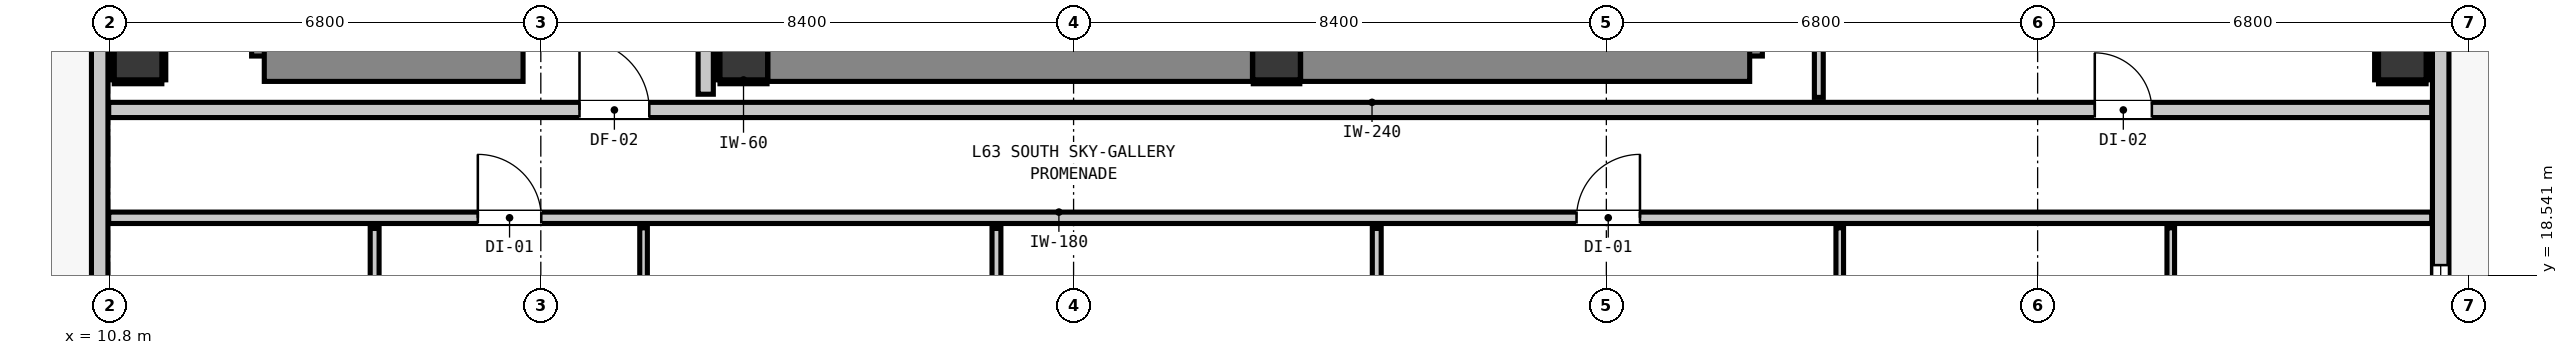
"""IFC4 building model, lengths in metres.
Left out: names, types, materials, properties, quantities, classifications, styles, units other than length and angle.
Written with IfcOpenShell. Run it as: python <this file> out.ifc"""

import sys

from ifc_helpers import new_model, si_unit, direction, frame, frame_2d, origin, origin_2d, place, context, subcontext, project, spatial, rectangle, extrude, element, fill, save


model = new_model("IFC4")
c1 = context("Model", 3, precision=1e-05, world=origin(), true_north=direction((0.0, 1.0)))
c2 = subcontext(c1, "Body", "Model", "MODEL_VIEW")
j1 = project(units=[si_unit("LENGTHUNIT", "METRE"), si_unit("PLANEANGLEUNIT", "RADIAN")], contexts=[c1])
p1 = place(None, origin())
s1 = spatial("IfcSite", under=j1, at=p1, CompositionType="ELEMENT")
p2 = place(p1, origin())
s2 = spatial("IfcBuilding", under=s1, at=p2, CompositionType="ELEMENT")
p3 = place(p2, frame((0.0, 0.0, 216.72)))
s3 = spatial("IfcBuildingStorey", under=s2, at=p3, CompositionType="ELEMENT", Elevation=216.72)
for number, where, z_axis, x_axis in (
    (1, (20.8, 22.0, 0.0), (0.0, 0.0, 1.0), (1.0, 0.0, 0.0)),
    (2, (29.2, 22.0, 0.0), (0.0, 0.0, 1.0), (1.0, 0.0, 0.0)),
):
    element("IfcColumn", number, at=place(p3, frame(where, z_axis=z_axis, x_axis=x_axis)), inside=s3, PredefinedType="COLUMN", context=c2, shape_type="SweptSolid", body=[
        extrude(rectangle(XDim=0.75, YDim=0.75, at=origin_2d()), origin(), (0.0, 0.0, 1.0), 3.32),
    ])
p4 = place(p3, frame((13.44, 22.0, 0.0), z_axis=(0.0, 0.0, 1.0), x_axis=(0.0, 1.0, 0.0)))
e3 = element("IfcWall", 3, at=p4, inside=s3, PredefinedType="SHEAR", context=c2, shape_type="SweptSolid", body=[
    extrude(rectangle(XDim=8.32, YDim=0.8, at=frame_2d((4.16, 0.0))), origin(), (0.0, 0.0, 1.0), 3.32),
])
p5 = place(p3, frame((13.24, 22.0, 0.0), z_axis=(0.0, 0.0, 1.0), x_axis=(1.0, 0.0, 0.0)))
e4 = element("IfcWall", 4, at=p5, inside=s3, PredefinedType="SHEAR", context=c2, shape_type="SweptSolid", body=[
    extrude(rectangle(XDim=4.08, YDim=0.8, at=frame_2d((2.04, 0.0))), origin(), (0.0, 0.0, 1.0), 3.32),
])
p6 = place(p3, frame((36.46, 22.0, 0.0), z_axis=(0.0, 0.0, 1.0), x_axis=(0.0, 1.0, 0.0)))
e5 = element("IfcWall", 5, at=p6, inside=s3, PredefinedType="SHEAR", context=c2, shape_type="SweptSolid", body=[
    extrude(rectangle(XDim=8.32, YDim=0.8, at=frame_2d((4.16, 0.0))), origin(), (0.0, 0.0, 1.0), 3.32),
])
p7 = place(p3, frame((29.58, 22.0, 0.0), z_axis=(0.0, 0.0, 1.0), x_axis=(1.0, 0.0, 0.0)))
e6 = element("IfcWall", 6, at=p7, inside=s3, PredefinedType="SHEAR", context=c2, shape_type="SweptSolid", body=[
    extrude(rectangle(XDim=7.08, YDim=0.8, at=frame_2d((3.54, 0.0))), origin(), (0.0, 0.0, 1.0), 3.32),
])
p8 = place(p3, frame((21.18, 22.0, 0.0), z_axis=(0.0, 0.0, 1.0), x_axis=(1.0, 0.0, 0.0)))
e7 = element("IfcWall", 7, at=p8, inside=s3, PredefinedType="SHEAR", context=c2, shape_type="SweptSolid", body=[
    extrude(rectangle(XDim=7.64, YDim=0.8, at=frame_2d((3.82, 0.0))), origin(), (0.0, 0.0, 1.0), 3.32),
])
for number, where, z_axis, x_axis in (
    (8, (11.25, 22.0, 0.0), (0.0, 0.0, 1.0), (1.0, 0.0, 0.0)),
    (9, (46.95, 22.0, 0.0), (0.0, 0.0, 1.0), (1.0, 0.0, 0.0)),
):
    element("IfcColumn", number, at=place(p3, frame(where, z_axis=z_axis, x_axis=x_axis)), inside=s3, PredefinedType="COLUMN", context=c2, shape_type="SweptSolid", body=[
        extrude(rectangle(XDim=0.75, YDim=0.75, at=origin_2d()), origin(), (0.0, 0.0, 1.0), 3.32),
    ])
p9 = place(p3, frame((10.645, 12.345, 0.0), z_axis=(0.0, 0.0, 1.0), x_axis=(0.0, 1.0, 0.0)))
e10 = element("IfcWall", 10, at=p9, inside=s3, PredefinedType="STANDARD", context=c2, shape_type="SweptSolid", body=[
    extrude(rectangle(XDim=30.31, YDim=0.26, at=frame_2d((15.155, 0.0))), origin(), (0.0, 0.0, 1.0), 3.1),
])
p10 = place(p9, frame((0.91, 0.0, 0.0)))
e11 = element("IfcOpeningElement", 11, at=p10, cuts=e10, PredefinedType="OPENING", context=c2, shape_type="SweptSolid", body=[
    extrude(rectangle(XDim=1.0, YDim=2.15, at=frame_2d((0.5, 1.075))), frame((0.0, 0.14, 0.0), z_axis=(0.0, -1.0, 0.0), x_axis=(1.0, 0.0, 0.0)), (0.0, 0.0, 1.0), 0.28),
])
p11 = place(p9, frame((2.322, 0.0, 0.85)))
e12 = element("IfcOpeningElement", 12, at=p11, cuts=e10, PredefinedType="OPENING", context=c2, shape_type="SweptSolid", body=[
    extrude(rectangle(XDim=0.58, YDim=1.5, at=frame_2d((0.29, 0.75))), frame((0.0, 0.14, 0.0), z_axis=(0.0, -1.0, 0.0), x_axis=(1.0, 0.0, 0.0)), (0.0, 0.0, 1.0), 0.28),
])
p12 = place(p3, frame((47.555, 42.655, 0.0), z_axis=(0.0, 0.0, 1.0), x_axis=(0.0, -1.0, 0.0)))
e13 = element("IfcWall", 13, at=p12, inside=s3, PredefinedType="STANDARD", context=c2, shape_type="SweptSolid", body=[
    extrude(rectangle(XDim=30.31, YDim=0.26, at=frame_2d((15.155, 0.0))), origin(), (0.0, 0.0, 1.0), 3.1),
])
p13 = place(p12, frame((4.082, 0.0, 0.0)))
e14 = element("IfcOpeningElement", 14, at=p13, cuts=e13, PredefinedType="OPENING", context=c2, shape_type="SweptSolid", body=[
    extrude(rectangle(XDim=1.0, YDim=2.15, at=frame_2d((0.5, 1.075))), frame((0.0, 0.14, 0.0), z_axis=(0.0, -1.0, 0.0), x_axis=(1.0, 0.0, 0.0)), (0.0, 0.0, 1.0), 0.28),
])
p14 = place(p12, frame((23.951, 0.0, 0.85)))
e15 = element("IfcOpeningElement", 15, at=p14, cuts=e13, PredefinedType="OPENING", context=c2, shape_type="SweptSolid", body=[
    extrude(rectangle(XDim=2.4, YDim=1.95, at=frame_2d((1.2, 0.975))), frame((0.0, 0.14, 0.0), z_axis=(0.0, -1.0, 0.0), x_axis=(1.0, 0.0, 0.0)), (0.0, 0.0, 1.0), 0.28),
])
p15 = place(p12, frame((27.508, 0.0, 0.85)))
e16 = element("IfcOpeningElement", 16, at=p15, cuts=e13, PredefinedType="OPENING", context=c2, shape_type="SweptSolid", body=[
    extrude(rectangle(XDim=2.4, YDim=1.95, at=frame_2d((1.2, 0.975))), frame((0.0, 0.14, 0.0), z_axis=(0.0, -1.0, 0.0), x_axis=(1.0, 0.0, 0.0)), (0.0, 0.0, 1.0), 0.28),
])
p16 = place(p12, frame((15.105, 0.0, 0.85)))
e17 = element("IfcOpeningElement", 17, at=p16, cuts=e13, PredefinedType="OPENING", context=c2, shape_type="SweptSolid", body=[
    extrude(rectangle(XDim=2.4, YDim=1.95, at=frame_2d((1.2, 0.975))), frame((0.0, 0.14, 0.0), z_axis=(0.0, -1.0, 0.0), x_axis=(1.0, 0.0, 0.0)), (0.0, 0.0, 1.0), 0.28),
])
p17 = place(p3, frame((10.787, 21.15, 0.0), z_axis=(0.0, 0.0, 1.0), x_axis=(1.0, 0.0, 0.0)))
e18 = element("IfcWall", 18, at=p17, inside=s3, PredefinedType="PARTITIONING", context=c2, shape_type="SweptSolid", body=[
    extrude(rectangle(XDim=36.626, YDim=0.24, at=frame_2d((18.313, 0.0))), origin(), (0.0, 0.0, 1.0), 3.1),
])
p18 = place(p17, frame((7.423, 0.0, 0.0)))
e19 = element("IfcOpeningElement", 19, at=p18, cuts=e18, PredefinedType="OPENING", context=c2, shape_type="SweptSolid", body=[
    extrude(rectangle(XDim=1.1, YDim=2.15, at=frame_2d((0.55, 1.075))), frame((0.0, 0.13, 0.0), z_axis=(0.0, -1.0, 0.0), x_axis=(1.0, 0.0, 0.0)), (0.0, 0.0, 1.0), 0.26),
])
p19 = place(p17, frame((31.314, 0.0, 0.0)))
e20 = element("IfcOpeningElement", 20, at=p19, cuts=e18, PredefinedType="OPENING", context=c2, shape_type="SweptSolid", body=[
    extrude(rectangle(XDim=0.9, YDim=2.1, at=frame_2d((0.45, 1.05))), frame((0.0, 0.13, 0.0), z_axis=(0.0, -1.0, 0.0), x_axis=(1.0, 0.0, 0.0)), (0.0, 0.0, 1.0), 0.26),
])
p20 = place(p3, frame((10.787, 19.45, 0.0), z_axis=(0.0, 0.0, 1.0), x_axis=(1.0, 0.0, 0.0)))
e21 = element("IfcWall", 21, at=p20, inside=s3, PredefinedType="PARTITIONING", context=c2, shape_type="SweptSolid", body=[
    extrude(rectangle(XDim=36.626, YDim=0.18, at=frame_2d((18.313, 0.0))), origin(), (0.0, 0.0, 1.0), 3.1),
])
p21 = place(p20, frame((5.82, 0.0, 0.0)))
e22 = element("IfcOpeningElement", 22, at=p21, cuts=e21, PredefinedType="OPENING", context=c2, shape_type="SweptSolid", body=[
    extrude(rectangle(XDim=1.0, YDim=2.15, at=frame_2d((0.5, 1.075))), frame((0.0, 0.1, 0.0), z_axis=(0.0, -1.0, 0.0), x_axis=(1.0, 0.0, 0.0)), (0.0, 0.0, 1.0), 0.2),
])
p22 = place(p20, frame((23.143, 0.0, 0.0)))
e23 = element("IfcOpeningElement", 23, at=p22, cuts=e21, PredefinedType="OPENING", context=c2, shape_type="SweptSolid", body=[
    extrude(rectangle(XDim=1.0, YDim=2.15, at=frame_2d((0.5, 1.075))), frame((0.0, 0.1, 0.0), z_axis=(0.0, -1.0, 0.0), x_axis=(1.0, 0.0, 0.0)), (0.0, 0.0, 1.0), 0.2),
])
p23 = place(p3, frame((20.2, 21.398, 0.0), z_axis=(0.0, 0.0, 1.0), x_axis=(0.0, 1.0, 0.0)))
e24 = element("IfcWall", 24, at=p23, inside=s3, PredefinedType="PARTITIONING", context=c2, shape_type="SweptSolid", body=[
    extrude(rectangle(XDim=6.754, YDim=0.24, at=frame_2d((3.377, 0.0))), origin(), (0.0, 0.0, 1.0), 3.1),
])
p24 = place(p3, frame((14.98, 15.707, 0.0), z_axis=(0.0, 0.0, 1.0), x_axis=(0.0, 1.0, 0.0)))
e25 = element("IfcWall", 25, at=p24, inside=s3, PredefinedType="PARTITIONING", context=c2, shape_type="SweptSolid", body=[
    extrude(rectangle(XDim=3.575, YDim=0.14, at=frame_2d((1.788, 0.0))), origin(), (0.0, 0.0, 1.0), 3.1),
])
p25 = place(p24, frame((1.355, 0.0, 0.0)))
e26 = element("IfcOpeningElement", 26, at=p25, cuts=e25, PredefinedType="OPENING", context=c2, shape_type="SweptSolid", body=[
    extrude(rectangle(XDim=0.86, YDim=2.02, at=frame_2d((0.43, 1.01))), frame((0.0, 0.08, 0.0), z_axis=(0.0, -1.0, 0.0), x_axis=(1.0, 0.0, 0.0)), (0.0, 0.0, 1.0), 0.16),
])
p26 = place(p3, frame((24.784, 15.707, 0.0), z_axis=(0.0, 0.0, 1.0), x_axis=(0.0, 1.0, 0.0)))
e27 = element("IfcWall", 27, at=p26, inside=s3, PredefinedType="PARTITIONING", context=c2, shape_type="SweptSolid", body=[
    extrude(rectangle(XDim=3.575, YDim=0.14, at=frame_2d((1.788, 0.0))), origin(), (0.0, 0.0, 1.0), 3.1),
])
p27 = place(p3, frame((30.78, 15.707, 0.0), z_axis=(0.0, 0.0, 1.0), x_axis=(0.0, 1.0, 0.0)))
e28 = element("IfcWall", 28, at=p27, inside=s3, PredefinedType="PARTITIONING", context=c2, shape_type="SweptSolid", body=[
    extrude(rectangle(XDim=3.575, YDim=0.14, at=frame_2d((1.788, 0.0))), origin(), (0.0, 0.0, 1.0), 3.1),
])
p28 = place(p27, frame((1.355, 0.0, 0.0)))
e29 = element("IfcOpeningElement", 29, at=p28, cuts=e28, PredefinedType="OPENING", context=c2, shape_type="SweptSolid", body=[
    extrude(rectangle(XDim=0.86, YDim=2.02, at=frame_2d((0.43, 1.01))), frame((0.0, 0.08, 0.0), z_axis=(0.0, -1.0, 0.0), x_axis=(1.0, 0.0, 0.0)), (0.0, 0.0, 1.0), 0.16),
])
p29 = place(p3, frame((37.75, 21.348, 0.0), z_axis=(0.0, 0.0, 1.0), x_axis=(0.0, 1.0, 0.0)))
e30 = element("IfcWall", 30, at=p29, inside=s3, PredefinedType="PARTITIONING", context=c2, shape_type="SweptSolid", body=[
    extrude(rectangle(XDim=10.134, YDim=0.14, at=frame_2d((5.067, 0.0))), origin(), (0.0, 0.0, 1.0), 3.1),
])
p30 = place(p3, frame((19.22, 15.697, 0.0), z_axis=(0.0, 0.0, 1.0), x_axis=(0.0, 1.0, 0.0)))
e31 = element("IfcWall", 31, at=p30, inside=s3, PredefinedType="PARTITIONING", context=c2, shape_type="SweptSolid", body=[
    extrude(rectangle(XDim=3.595, YDim=0.12, at=frame_2d((1.797, 0.0))), origin(), (0.0, 0.0, 1.0), 3.1),
])
p31 = place(p30, frame((1.345, 0.0, 0.0)))
e32 = element("IfcOpeningElement", 32, at=p31, cuts=e31, PredefinedType="OPENING", context=c2, shape_type="SweptSolid", body=[
    extrude(rectangle(XDim=0.9, YDim=2.1, at=frame_2d((0.45, 1.05))), frame((0.0, 0.07, 0.0), z_axis=(0.0, -1.0, 0.0), x_axis=(1.0, 0.0, 0.0)), (0.0, 0.0, 1.0), 0.14),
])
p32 = place(p3, frame((38.08, 15.697, 0.0), z_axis=(0.0, 0.0, 1.0), x_axis=(0.0, 1.0, 0.0)))
e33 = element("IfcWall", 33, at=p32, inside=s3, PredefinedType="PARTITIONING", context=c2, shape_type="SweptSolid", body=[
    extrude(rectangle(XDim=3.595, YDim=0.12, at=frame_2d((1.797, 0.0))), origin(), (0.0, 0.0, 1.0), 3.1),
])
p33 = place(p32, frame((1.345, 0.0, 0.0)))
e34 = element("IfcOpeningElement", 34, at=p33, cuts=e33, PredefinedType="OPENING", context=c2, shape_type="SweptSolid", body=[
    extrude(rectangle(XDim=0.9, YDim=2.1, at=frame_2d((0.45, 1.05))), frame((0.0, 0.07, 0.0), z_axis=(0.0, -1.0, 0.0), x_axis=(1.0, 0.0, 0.0)), (0.0, 0.0, 1.0), 0.14),
])
p34 = place(p3, frame((43.299, 15.697, 0.0), z_axis=(0.0, 0.0, 1.0), x_axis=(0.0, 1.0, 0.0)))
e35 = element("IfcWall", 35, at=p34, inside=s3, PredefinedType="PARTITIONING", context=c2, shape_type="SweptSolid", body=[
    extrude(rectangle(XDim=3.595, YDim=0.12, at=frame_2d((1.797, 0.0))), origin(), (0.0, 0.0, 1.0), 3.1),
])
p35 = place(p34, frame((1.358, 0.0, 0.0)))
e36 = element("IfcOpeningElement", 36, at=p35, cuts=e35, PredefinedType="OPENING", context=c2, shape_type="SweptSolid", body=[
    extrude(rectangle(XDim=0.9, YDim=2.1, at=frame_2d((0.45, 1.05))), frame((0.0, 0.07, 0.0), z_axis=(0.0, -1.0, 0.0), x_axis=(1.0, 0.0, 0.0)), (0.0, 0.0, 1.0), 0.14),
])
p36 = place(p3, frame((20.425, 21.593, 0.0), z_axis=(0.0, 0.0, 1.0), x_axis=(1.0, 0.0, 0.0)))
e37 = element("IfcWall", 37, at=p36, inside=s3, PredefinedType="PARTITIONING", context=c2, shape_type="SweptSolid", body=[
    extrude(rectangle(XDim=0.742, YDim=0.06, at=frame_2d((0.371, 0.0))), origin(), (0.0, 0.0, 1.0), 1.45),
])
p37 = place(p3, frame((20.393, 21.625, 0.0), z_axis=(0.0, 0.0, 1.0), x_axis=(0.0, 1.0, 0.0)))
e38 = element("IfcWall", 38, at=p37, inside=s3, PredefinedType="PARTITIONING", context=c2, shape_type="SweptSolid", body=[
    extrude(rectangle(XDim=0.75, YDim=0.06, at=frame_2d((0.375, 0.0))), origin(), (0.0, 0.0, 1.0), 1.45),
])
p38 = place(p3, frame((28.833, 21.593, 0.0), z_axis=(0.0, 0.0, 1.0), x_axis=(1.0, 0.0, 0.0)))
e39 = element("IfcWall", 39, at=p38, inside=s3, PredefinedType="PARTITIONING", context=c2, shape_type="SweptSolid", body=[
    extrude(rectangle(XDim=0.734, YDim=0.06, at=frame_2d((0.367, 0.0))), origin(), (0.0, 0.0, 1.0), 1.45),
])
for number, where, z_axis, x_axis in (
    (40, (10.875, 21.593, 0.0), (0.0, 0.0, 1.0), (1.0, 0.0, 0.0)),
    (41, (10.843, 21.625, 0.0), (0.0, 0.0, 1.0), (0.0, 1.0, 0.0)),
    (42, (11.657, 21.625, 0.0), (0.0, 0.0, 1.0), (0.0, 1.0, 0.0)),
    (43, (46.575, 21.593, 0.0), (0.0, 0.0, 1.0), (1.0, 0.0, 0.0)),
    (44, (46.543, 21.625, 0.0), (0.0, 0.0, 1.0), (0.0, 1.0, 0.0)),
    (45, (47.357, 21.625, 0.0), (0.0, 0.0, 1.0), (0.0, 1.0, 0.0)),
):
    element("IfcWall", number, at=place(p3, frame(where, z_axis=z_axis, x_axis=x_axis)), inside=s3, PredefinedType="PARTITIONING", context=c2, shape_type="SweptSolid", body=[
        extrude(rectangle(XDim=0.75, YDim=0.06, at=frame_2d((0.375, 0.0))), origin(), (0.0, 0.0, 1.0), 1.45),
    ])
p39 = place(p14, origin())
e46 = element("IfcWindow", 46, at=p39, inside=s3, PartitioningType="SINGLE_PANEL", PredefinedType="WINDOW", context=c2, shape_type="SweptSolid", body=[
    extrude(rectangle(XDim=2.4, YDim=1.95, at=frame_2d((1.2, 0.975))), frame((0.0, 0.03, 0.0), z_axis=(0.0, -1.0, 0.0), x_axis=(1.0, 0.0, 0.0)), (0.0, 0.0, 1.0), 0.06),
])
fill(e15, e46)
p40 = place(p18, origin())
e47 = element("IfcDoor", 47, at=p40, inside=s3, OperationType="SINGLE_SWING_LEFT", PredefinedType="DOOR", context=c2, shape_type="SweptSolid", body=[
    extrude(rectangle(XDim=1.1, YDim=2.15, at=frame_2d((0.55, 1.075))), frame((0.0, 0.025, 0.0), z_axis=(0.0, -1.0, 0.0), x_axis=(1.0, 0.0, 0.0)), (0.0, 0.0, 1.0), 0.05),
])
fill(e19, e47)
p41 = place(p21, origin())
e48 = element("IfcDoor", 48, at=p41, inside=s3, OperationType="SINGLE_SWING_LEFT", PredefinedType="DOOR", context=c2, shape_type="SweptSolid", body=[
    extrude(rectangle(XDim=1.0, YDim=2.15, at=frame_2d((0.5, 1.075))), frame((0.0, 0.025, 0.0), z_axis=(0.0, -1.0, 0.0), x_axis=(1.0, 0.0, 0.0)), (0.0, 0.0, 1.0), 0.05),
])
fill(e22, e48)
p42 = place(p22, origin())
e49 = element("IfcDoor", 49, at=p42, inside=s3, OperationType="SINGLE_SWING_RIGHT", PredefinedType="DOOR", context=c2, shape_type="SweptSolid", body=[
    extrude(rectangle(XDim=1.0, YDim=2.15, at=frame_2d((0.5, 1.075))), frame((0.0, 0.025, 0.0), z_axis=(0.0, -1.0, 0.0), x_axis=(1.0, 0.0, 0.0)), (0.0, 0.0, 1.0), 0.05),
])
fill(e23, e49)
p43 = place(p19, origin())
e50 = element("IfcDoor", 50, at=p43, inside=s3, OperationType="SINGLE_SWING_LEFT", PredefinedType="DOOR", context=c2, shape_type="SweptSolid", body=[
    extrude(rectangle(XDim=0.9, YDim=2.1, at=frame_2d((0.45, 1.05))), frame((0.0, 0.025, 0.0), z_axis=(0.0, -1.0, 0.0), x_axis=(1.0, 0.0, 0.0)), (0.0, 0.0, 1.0), 0.05),
])
fill(e20, e50)
save(model, sys.argv[1])
